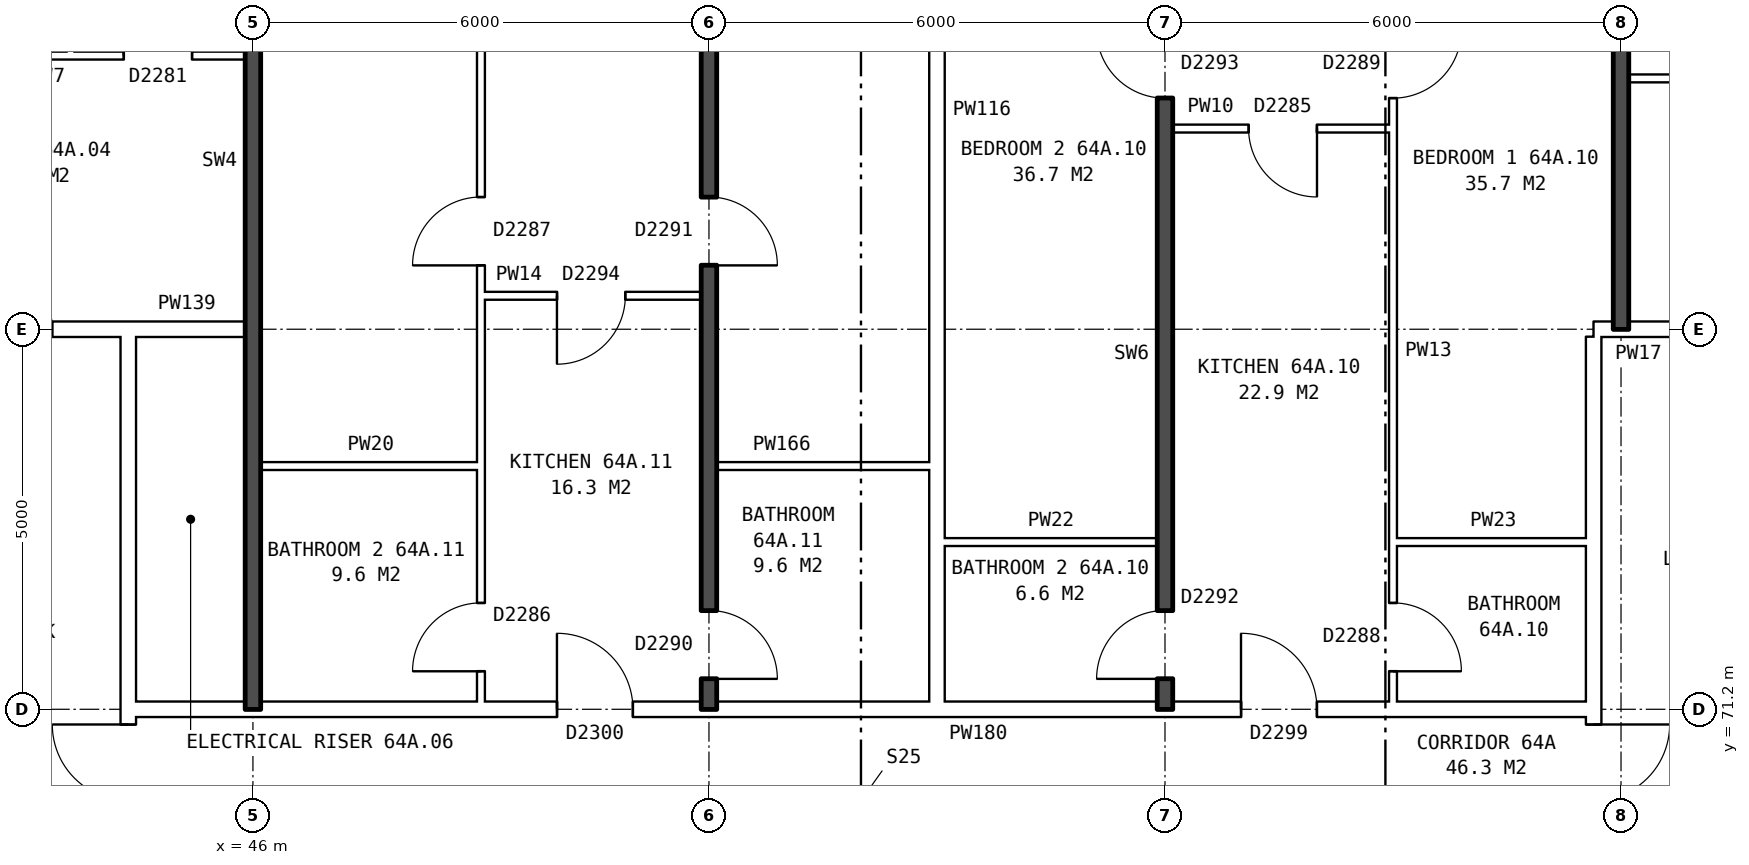
"""IFC4 building model, lengths in metres.
Left out: names, types, materials, properties, quantities, classifications, styles, units other than length and angle.
Written with IfcOpenShell. Run it as: python <this file> out.ifc"""

import sys

from ifc_helpers import new_model, si_unit, direction, frame, frame_2d, origin, place, context, subcontext, project, spatial, rectangle, extrude, element, fill, save


model = new_model("IFC4")
c1 = context("Model", 3, precision=1e-05, world=origin(), true_north=direction((0.0, 1.0)))
c2 = subcontext(c1, "Body", "Model", "MODEL_VIEW")
j1 = project(units=[si_unit("LENGTHUNIT", "METRE"), si_unit("PLANEANGLEUNIT", "RADIAN")], contexts=[c1])
p1 = place(None, origin())
s1 = spatial("IfcSite", under=j1, at=p1, CompositionType="ELEMENT")
p2 = place(p1, origin())
s2 = spatial("IfcBuilding", under=s1, at=p2, CompositionType="ELEMENT")
p3 = place(p2, frame((0.0, 0.0, 227.6)))
s3 = spatial("IfcBuildingStorey", under=s2, at=p3, CompositionType="ELEMENT", Elevation=227.6)
p4 = place(p3, frame((63.64, 63.9, 0.0), z_axis=(0.0, 0.0, 1.0), x_axis=(0.0, 1.0, 0.0)))
e1 = element("IfcWall", 1, at=p4, inside=s3, PredefinedType="PARTITIONING", context=c2, shape_type="SweptSolid", body=[
    extrude(rectangle(XDim=12.2, YDim=0.2, at=frame_2d((6.1, 0.0))), origin(), (0.0, 0.0, 1.0), 2.85),
])
p5 = place(p4, frame((5.1, 0.0, 0.0)))
e2 = element("IfcOpeningElement", 2, at=p5, cuts=e1, PredefinedType="OPENING", context=c2, shape_type="SweptSolid", body=[
    extrude(rectangle(XDim=2.0, YDim=2.1, at=frame_2d((1.0, 1.05))), frame((0.0, 0.11, 0.0), z_axis=(0.0, -1.0, 0.0), x_axis=(1.0, 0.0, 0.0)), (0.0, 0.0, 1.0), 0.22),
])
p6 = place(p3, frame((44.36, 63.9, 0.0), z_axis=(0.0, 0.0, 1.0), x_axis=(0.0, 1.0, 0.0)))
e3 = element("IfcWall", 3, at=p6, inside=s3, PredefinedType="PARTITIONING", context=c2, shape_type="SweptSolid", body=[
    extrude(rectangle(XDim=12.2, YDim=0.2, at=frame_2d((6.1, 0.0))), origin(), (0.0, 0.0, 1.0), 2.85),
])
p7 = place(p6, frame((5.1, 0.0, 0.0)))
e4 = element("IfcOpeningElement", 4, at=p7, cuts=e3, PredefinedType="OPENING", context=c2, shape_type="SweptSolid", body=[
    extrude(rectangle(XDim=2.0, YDim=2.1, at=frame_2d((1.0, 1.05))), frame((0.0, 0.11, 0.0), z_axis=(0.0, -1.0, 0.0), x_axis=(1.0, 0.0, 0.0)), (0.0, 0.0, 1.0), 0.22),
])
p8 = place(p3, frame((44.36, 71.2, 0.0), z_axis=(0.0, 0.0, 1.0), x_axis=(1.0, 0.0, 0.0)))
e5 = element("IfcWall", 5, at=p8, inside=s3, PredefinedType="PARTITIONING", context=c2, shape_type="SweptSolid", body=[
    extrude(rectangle(XDim=19.28, YDim=0.2, at=frame_2d((9.64, 0.0))), origin(), (0.0, 0.0, 1.0), 2.85),
])
p9 = place(p8, frame((14.64, 0.0, 0.0)))
e6 = element("IfcOpeningElement", 6, at=p9, cuts=e5, PredefinedType="OPENING", context=c2, shape_type="SweptSolid", body=[
    extrude(rectangle(XDim=1.0, YDim=2.1, at=frame_2d((0.5, 1.05))), frame((0.0, 0.11, 0.0), z_axis=(0.0, -1.0, 0.0), x_axis=(1.0, 0.0, 0.0)), (0.0, 0.0, 1.0), 0.22),
])
p10 = place(p8, frame((5.64, 0.0, 0.0)))
e7 = element("IfcOpeningElement", 7, at=p10, cuts=e5, PredefinedType="OPENING", context=c2, shape_type="SweptSolid", body=[
    extrude(rectangle(XDim=1.0, YDim=2.1, at=frame_2d((0.5, 1.05))), frame((0.0, 0.11, 0.0), z_axis=(0.0, -1.0, 0.0), x_axis=(1.0, 0.0, 0.0)), (0.0, 0.0, 1.0), 0.22),
])
p11 = place(p3, frame((55.1, 73.4, 0.0), z_axis=(0.0, 0.0, 1.0), x_axis=(1.0, 0.0, 0.0)))
e8 = element("IfcWall", 8, at=p11, inside=s3, PredefinedType="PARTITIONING", context=c2, shape_type="SweptSolid", body=[
    extrude(rectangle(XDim=2.8, YDim=0.1, at=frame_2d((1.4, 0.0))), origin(), (0.0, 0.0, 1.0), 2.85),
])
p12 = place(p3, frame((61.0, 73.4, 0.0), z_axis=(0.0, 0.0, 1.0), x_axis=(1.0, 0.0, 0.0)))
e9 = element("IfcWall", 9, at=p12, inside=s3, PredefinedType="PARTITIONING", context=c2, shape_type="SweptSolid", body=[
    extrude(rectangle(XDim=2.64, YDim=0.1, at=frame_2d((1.32, 0.0))), origin(), (0.0, 0.0, 1.0), 2.85),
])
p13 = place(p3, frame((46.1, 74.4, 0.0), z_axis=(0.0, 0.0, 1.0), x_axis=(1.0, 0.0, 0.0)))
e10 = element("IfcWall", 10, at=p13, inside=s3, PredefinedType="PARTITIONING", context=c2, shape_type="SweptSolid", body=[
    extrude(rectangle(XDim=2.9, YDim=0.1, at=frame_2d((1.45, 0.0))), origin(), (0.0, 0.0, 1.0), 2.85),
])
p14 = place(p3, frame((52.1, 74.4, 0.0), z_axis=(0.0, 0.0, 1.0), x_axis=(1.0, 0.0, 0.0)))
e11 = element("IfcWall", 11, at=p14, inside=s3, PredefinedType="PARTITIONING", context=c2, shape_type="SweptSolid", body=[
    extrude(rectangle(XDim=2.8, YDim=0.1, at=frame_2d((1.4, 0.0))), origin(), (0.0, 0.0, 1.0), 2.85),
])
p15 = place(p3, frame((41.36, 76.2, 0.0), z_axis=(0.0, 0.0, 1.0), x_axis=(1.0, 0.0, 0.0)))
e12 = element("IfcWall", 12, at=p15, inside=s3, PredefinedType="PARTITIONING", context=c2, shape_type="SweptSolid", body=[
    extrude(rectangle(XDim=3.0, YDim=0.2, at=frame_2d((1.5, 0.0))), origin(), (0.0, 0.0, 1.0), 2.85),
])
p16 = place(p15, frame((1.0, 0.0, 0.0)))
e13 = element("IfcOpeningElement", 13, at=p16, cuts=e12, PredefinedType="OPENING", context=c2, shape_type="SweptSolid", body=[
    extrude(rectangle(XDim=1.0, YDim=2.1, at=frame_2d((0.5, 1.05))), frame((0.0, 0.11, 0.0), z_axis=(0.0, -1.0, 0.0), x_axis=(1.0, 0.0, 0.0)), (0.0, 0.0, 1.0), 0.22),
])
p17 = place(p3, frame((44.36, 76.2, 0.0), z_axis=(0.0, 0.0, 1.0), x_axis=(1.0, 0.0, 0.0)))
e14 = element("IfcWall", 14, at=p17, inside=s3, PredefinedType="PARTITIONING", context=c2, shape_type="SweptSolid", body=[
    extrude(rectangle(XDim=1.54, YDim=0.2, at=frame_2d((0.77, 0.0))), origin(), (0.0, 0.0, 1.0), 2.85),
])
p18 = place(p3, frame((63.64, 76.2, 0.0), z_axis=(0.0, 0.0, 1.0), x_axis=(1.0, 0.0, 0.0)))
e15 = element("IfcWall", 15, at=p18, inside=s3, PredefinedType="PARTITIONING", context=c2, shape_type="SweptSolid", body=[
    extrude(rectangle(XDim=3.0, YDim=0.2, at=frame_2d((1.5, 0.0))), origin(), (0.0, 0.0, 1.0), 2.85),
])
p19 = place(p18, frame((1.18, 0.0, 0.0)))
e16 = element("IfcOpeningElement", 16, at=p19, cuts=e15, PredefinedType="OPENING", context=c2, shape_type="SweptSolid", body=[
    extrude(rectangle(XDim=1.0, YDim=2.1, at=frame_2d((0.5, 1.05))), frame((0.0, 0.11, 0.0), z_axis=(0.0, -1.0, 0.0), x_axis=(1.0, 0.0, 0.0)), (0.0, 0.0, 1.0), 0.22),
])
p20 = place(p3, frame((49.0, 76.64, 0.0), z_axis=(0.0, 0.0, 1.0), x_axis=(1.0, 0.0, 0.0)))
e17 = element("IfcWall", 17, at=p20, inside=s3, PredefinedType="PARTITIONING", context=c2, shape_type="SweptSolid", body=[
    extrude(rectangle(XDim=2.9, YDim=0.1, at=frame_2d((1.45, 0.0))), origin(), (0.0, 0.0, 1.0), 2.85),
])
p21 = place(p20, frame((1.0, 0.0, 0.0)))
e18 = element("IfcOpeningElement", 18, at=p21, cuts=e17, PredefinedType="OPENING", context=c2, shape_type="SweptSolid", body=[
    extrude(rectangle(XDim=0.9, YDim=2.1, at=frame_2d((0.45, 1.05))), frame((0.0, 0.06, 0.0), z_axis=(0.0, -1.0, 0.0), x_axis=(1.0, 0.0, 0.0)), (0.0, 0.0, 1.0), 0.12),
])
p22 = place(p3, frame((58.1, 78.84, 0.0), z_axis=(0.0, 0.0, 1.0), x_axis=(1.0, 0.0, 0.0)))
e19 = element("IfcWall", 19, at=p22, inside=s3, PredefinedType="PARTITIONING", context=c2, shape_type="SweptSolid", body=[
    extrude(rectangle(XDim=2.9, YDim=0.1, at=frame_2d((1.45, 0.0))), origin(), (0.0, 0.0, 1.0), 2.85),
])
p23 = place(p22, frame((1.0, 0.0, 0.0)))
e20 = element("IfcOpeningElement", 20, at=p23, cuts=e19, PredefinedType="OPENING", context=c2, shape_type="SweptSolid", body=[
    extrude(rectangle(XDim=0.9, YDim=2.1, at=frame_2d((0.45, 1.05))), frame((0.0, 0.06, 0.0), z_axis=(0.0, -1.0, 0.0), x_axis=(1.0, 0.0, 0.0)), (0.0, 0.0, 1.0), 0.12),
])
p24 = place(p3, frame((64.1, 79.5, 0.0), z_axis=(0.0, 0.0, 1.0), x_axis=(1.0, 0.0, 0.0)))
e21 = element("IfcWall", 21, at=p24, inside=s3, PredefinedType="PARTITIONING", context=c2, shape_type="SweptSolid", body=[
    extrude(rectangle(XDim=11.8, YDim=0.1, at=frame_2d((5.9, 0.0))), origin(), (0.0, 0.0, 1.0), 2.85),
])
p25 = place(p24, frame((3.65, 0.0, 0.0)))
e22 = element("IfcOpeningElement", 22, at=p25, cuts=e21, PredefinedType="OPENING", context=c2, shape_type="SweptSolid", body=[
    extrude(rectangle(XDim=0.9, YDim=2.1, at=frame_2d((0.45, 1.05))), frame((0.0, 0.06, 0.0), z_axis=(0.0, -1.0, 0.0), x_axis=(1.0, 0.0, 0.0)), (0.0, 0.0, 1.0), 0.12),
])
p26 = place(p24, frame((0.7, 0.0, 0.0)))
e23 = element("IfcOpeningElement", 23, at=p26, cuts=e21, PredefinedType="OPENING", context=c2, shape_type="SweptSolid", body=[
    extrude(rectangle(XDim=0.9, YDim=2.1, at=frame_2d((0.45, 1.05))), frame((0.0, 0.06, 0.0), z_axis=(0.0, -1.0, 0.0), x_axis=(1.0, 0.0, 0.0)), (0.0, 0.0, 1.0), 0.12),
])
p27 = place(p3, frame((40.1, 79.8, 0.0), z_axis=(0.0, 0.0, 1.0), x_axis=(1.0, 0.0, 0.0)))
e24 = element("IfcWall", 24, at=p27, inside=s3, PredefinedType="PARTITIONING", context=c2, shape_type="SweptSolid", body=[
    extrude(rectangle(XDim=5.8, YDim=0.1, at=frame_2d((2.9, 0.0))), origin(), (0.0, 0.0, 1.0), 2.85),
])
p28 = place(p27, frame((1.3, 0.0, 0.0)))
e25 = element("IfcOpeningElement", 25, at=p28, cuts=e24, PredefinedType="OPENING", context=c2, shape_type="SweptSolid", body=[
    extrude(rectangle(XDim=0.9, YDim=2.1, at=frame_2d((0.45, 1.05))), frame((0.0, 0.06, 0.0), z_axis=(0.0, -1.0, 0.0), x_axis=(1.0, 0.0, 0.0)), (0.0, 0.0, 1.0), 0.12),
])
p29 = place(p27, frame((4.2, 0.0, 0.0)))
e26 = element("IfcOpeningElement", 26, at=p29, cuts=e24, PredefinedType="OPENING", context=c2, shape_type="SweptSolid", body=[
    extrude(rectangle(XDim=0.9, YDim=2.1, at=frame_2d((0.45, 1.05))), frame((0.0, 0.06, 0.0), z_axis=(0.0, -1.0, 0.0), x_axis=(1.0, 0.0, 0.0)), (0.0, 0.0, 1.0), 0.12),
])
p30 = place(p3, frame((46.0, 71.2, 0.0), z_axis=(0.0, 0.0, 1.0), x_axis=(0.0, 1.0, 0.0)))
e27 = element("IfcWall", 27, at=p30, inside=s3, PredefinedType="SOLIDWALL", context=c2, shape_type="SweptSolid", body=[
    extrude(rectangle(XDim=14.44, YDim=0.2, at=frame_2d((7.22, 0.0))), origin(), (0.0, 0.0, 1.0), 2.85),
])
p31 = place(p3, frame((49.0, 71.3, 0.0), z_axis=(0.0, 0.0, 1.0), x_axis=(0.0, 1.0, 0.0)))
e28 = element("IfcWall", 28, at=p31, inside=s3, PredefinedType="PARTITIONING", context=c2, shape_type="SweptSolid", body=[
    extrude(rectangle(XDim=14.34, YDim=0.1, at=frame_2d((7.17, 0.0))), origin(), (0.0, 0.0, 1.0), 2.85),
])
p32 = place(p31, frame((5.74, 0.0, 0.0)))
e29 = element("IfcOpeningElement", 29, at=p32, cuts=e28, PredefinedType="OPENING", context=c2, shape_type="SweptSolid", body=[
    extrude(rectangle(XDim=0.9, YDim=2.1, at=frame_2d((0.45, 1.05))), frame((0.0, 0.06, 0.0), z_axis=(0.0, -1.0, 0.0), x_axis=(1.0, 0.0, 0.0)), (0.0, 0.0, 1.0), 0.12),
])
p33 = place(p31, frame((0.4, 0.0, 0.0)))
e30 = element("IfcOpeningElement", 30, at=p33, cuts=e28, PredefinedType="OPENING", context=c2, shape_type="SweptSolid", body=[
    extrude(rectangle(XDim=0.9, YDim=2.1, at=frame_2d((0.45, 1.05))), frame((0.0, 0.06, 0.0), z_axis=(0.0, -1.0, 0.0), x_axis=(1.0, 0.0, 0.0)), (0.0, 0.0, 1.0), 0.12),
])
p34 = place(p3, frame((52.0, 71.2, 0.0), z_axis=(0.0, 0.0, 1.0), x_axis=(0.0, 1.0, 0.0)))
e31 = element("IfcWall", 31, at=p34, inside=s3, PredefinedType="SOLIDWALL", context=c2, shape_type="SweptSolid", body=[
    extrude(rectangle(XDim=14.44, YDim=0.2, at=frame_2d((7.22, 0.0))), origin(), (0.0, 0.0, 1.0), 2.85),
])
p35 = place(p34, frame((5.84, 0.0, 0.0)))
e32 = element("IfcOpeningElement", 32, at=p35, cuts=e31, PredefinedType="OPENING", context=c2, shape_type="SweptSolid", body=[
    extrude(rectangle(XDim=0.9, YDim=2.1, at=frame_2d((0.45, 1.05))), frame((0.0, 0.11, 0.0), z_axis=(0.0, -1.0, 0.0), x_axis=(1.0, 0.0, 0.0)), (0.0, 0.0, 1.0), 0.22),
])
p36 = place(p34, frame((0.4, 0.0, 0.0)))
e33 = element("IfcOpeningElement", 33, at=p36, cuts=e31, PredefinedType="OPENING", context=c2, shape_type="SweptSolid", body=[
    extrude(rectangle(XDim=0.9, YDim=2.1, at=frame_2d((0.45, 1.05))), frame((0.0, 0.11, 0.0), z_axis=(0.0, -1.0, 0.0), x_axis=(1.0, 0.0, 0.0)), (0.0, 0.0, 1.0), 0.22),
])
p37 = place(p3, frame((55.0, 71.3, 0.0), z_axis=(0.0, 0.0, 1.0), x_axis=(0.0, 1.0, 0.0)))
e34 = element("IfcWall", 34, at=p37, inside=s3, PredefinedType="PARTITIONING", context=c2, shape_type="SweptSolid", body=[
    extrude(rectangle(XDim=14.34, YDim=0.2, at=frame_2d((7.17, 0.0))), origin(), (0.0, 0.0, 1.0), 2.85),
])
p38 = place(p3, frame((58.0, 71.2, 0.0), z_axis=(0.0, 0.0, 1.0), x_axis=(0.0, 1.0, 0.0)))
e35 = element("IfcWall", 35, at=p38, inside=s3, PredefinedType="SOLIDWALL", context=c2, shape_type="SweptSolid", body=[
    extrude(rectangle(XDim=14.44, YDim=0.2, at=frame_2d((7.22, 0.0))), origin(), (0.0, 0.0, 1.0), 2.85),
])
p39 = place(p38, frame((8.04, 0.0, 0.0)))
e36 = element("IfcOpeningElement", 36, at=p39, cuts=e35, PredefinedType="OPENING", context=c2, shape_type="SweptSolid", body=[
    extrude(rectangle(XDim=0.9, YDim=2.1, at=frame_2d((0.45, 1.05))), frame((0.0, 0.11, 0.0), z_axis=(0.0, -1.0, 0.0), x_axis=(1.0, 0.0, 0.0)), (0.0, 0.0, 1.0), 0.22),
])
p40 = place(p38, frame((0.4, 0.0, 0.0)))
e37 = element("IfcOpeningElement", 37, at=p40, cuts=e35, PredefinedType="OPENING", context=c2, shape_type="SweptSolid", body=[
    extrude(rectangle(XDim=0.9, YDim=2.1, at=frame_2d((0.45, 1.05))), frame((0.0, 0.11, 0.0), z_axis=(0.0, -1.0, 0.0), x_axis=(1.0, 0.0, 0.0)), (0.0, 0.0, 1.0), 0.22),
])
p41 = place(p3, frame((61.0, 71.3, 0.0), z_axis=(0.0, 0.0, 1.0), x_axis=(0.0, 1.0, 0.0)))
e38 = element("IfcWall", 38, at=p41, inside=s3, PredefinedType="PARTITIONING", context=c2, shape_type="SweptSolid", body=[
    extrude(rectangle(XDim=14.34, YDim=0.1, at=frame_2d((7.17, 0.0))), origin(), (0.0, 0.0, 1.0), 2.85),
])
p42 = place(p41, frame((7.94, 0.0, 0.0)))
e39 = element("IfcOpeningElement", 39, at=p42, cuts=e38, PredefinedType="OPENING", context=c2, shape_type="SweptSolid", body=[
    extrude(rectangle(XDim=0.9, YDim=2.1, at=frame_2d((0.45, 1.05))), frame((0.0, 0.06, 0.0), z_axis=(0.0, -1.0, 0.0), x_axis=(1.0, 0.0, 0.0)), (0.0, 0.0, 1.0), 0.12),
])
p43 = place(p41, frame((0.4, 0.0, 0.0)))
e40 = element("IfcOpeningElement", 40, at=p43, cuts=e38, PredefinedType="OPENING", context=c2, shape_type="SweptSolid", body=[
    extrude(rectangle(XDim=0.9, YDim=2.1, at=frame_2d((0.45, 1.05))), frame((0.0, 0.06, 0.0), z_axis=(0.0, -1.0, 0.0), x_axis=(1.0, 0.0, 0.0)), (0.0, 0.0, 1.0), 0.12),
])
p44 = place(p3, frame((64.0, 76.2, 0.0), z_axis=(0.0, 0.0, 1.0), x_axis=(0.0, 1.0, 0.0)))
e41 = element("IfcWall", 41, at=p44, inside=s3, PredefinedType="SOLIDWALL", context=c2, shape_type="SweptSolid", body=[
    extrude(rectangle(XDim=9.44, YDim=0.2, at=frame_2d((4.72, 0.0))), origin(), (0.0, 0.0, 1.0), 2.85),
])
p45 = place(p5, frame((2.0, 0.0, 0.0), z_axis=(0.0, 0.0, 1.0), x_axis=(-1.0, 0.0, 0.0)))
e42 = element("IfcDoor", 42, at=p45, inside=s3, OperationType="DOUBLE_DOOR_SINGLE_SWING", PredefinedType="DOOR", context=c2, shape_type="SweptSolid", body=[
    extrude(rectangle(XDim=2.0, YDim=2.1, at=frame_2d((1.0, 1.05))), frame((0.0, 0.025, 0.0), z_axis=(0.0, -1.0, 0.0), x_axis=(1.0, 0.0, 0.0)), (0.0, 0.0, 1.0), 0.05),
])
fill(e2, e42)
p46 = place(p7, origin())
e43 = element("IfcDoor", 43, at=p46, inside=s3, OperationType="DOUBLE_DOOR_SINGLE_SWING", PredefinedType="DOOR", context=c2, shape_type="SweptSolid", body=[
    extrude(rectangle(XDim=2.0, YDim=2.1, at=frame_2d((1.0, 1.05))), frame((0.0, 0.025, 0.0), z_axis=(0.0, -1.0, 0.0), x_axis=(1.0, 0.0, 0.0)), (0.0, 0.0, 1.0), 0.05),
])
fill(e4, e43)
p47 = place(p29, origin())
e44 = element("IfcDoor", 44, at=p47, inside=s3, OperationType="SINGLE_SWING_LEFT", PredefinedType="DOOR", context=c2, shape_type="SweptSolid", body=[
    extrude(rectangle(XDim=0.9, YDim=2.1, at=frame_2d((0.45, 1.05))), frame((0.0, 0.025, 0.0), z_axis=(0.0, -1.0, 0.0), x_axis=(1.0, 0.0, 0.0)), (0.0, 0.0, 1.0), 0.05),
])
fill(e26, e44)
p48 = place(p42, frame((0.9, 0.0, 0.0), z_axis=(0.0, 0.0, 1.0), x_axis=(-1.0, 0.0, 0.0)))
e45 = element("IfcDoor", 45, at=p48, inside=s3, OperationType="SINGLE_SWING_LEFT", PredefinedType="DOOR", context=c2, shape_type="SweptSolid", body=[
    extrude(rectangle(XDim=0.9, YDim=2.1, at=frame_2d((0.45, 1.05))), frame((0.0, 0.025, 0.0), z_axis=(0.0, -1.0, 0.0), x_axis=(1.0, 0.0, 0.0)), (0.0, 0.0, 1.0), 0.05),
])
fill(e39, e45)
p49 = place(p39, origin())
e46 = element("IfcDoor", 46, at=p49, inside=s3, OperationType="SINGLE_SWING_RIGHT", PredefinedType="DOOR", context=c2, shape_type="SweptSolid", body=[
    extrude(rectangle(XDim=0.9, YDim=2.1, at=frame_2d((0.45, 1.05))), frame((0.0, 0.025, 0.0), z_axis=(0.0, -1.0, 0.0), x_axis=(1.0, 0.0, 0.0)), (0.0, 0.0, 1.0), 0.05),
])
fill(e36, e46)
p50 = place(p9, origin())
e47 = element("IfcDoor", 47, at=p50, inside=s3, OperationType="SINGLE_SWING_LEFT", PredefinedType="DOOR", context=c2, shape_type="SweptSolid", body=[
    extrude(rectangle(XDim=1.0, YDim=2.1, at=frame_2d((0.5, 1.05))), frame((0.0, 0.025, 0.0), z_axis=(0.0, -1.0, 0.0), x_axis=(1.0, 0.0, 0.0)), (0.0, 0.0, 1.0), 0.05),
])
fill(e6, e47)
p51 = place(p23, frame((0.9, 0.0, 0.0), z_axis=(0.0, 0.0, 1.0), x_axis=(-1.0, 0.0, 0.0)))
e48 = element("IfcDoor", 48, at=p51, inside=s3, OperationType="SINGLE_SWING_LEFT", PredefinedType="DOOR", context=c2, shape_type="SweptSolid", body=[
    extrude(rectangle(XDim=0.9, YDim=2.1, at=frame_2d((0.45, 1.05))), frame((0.0, 0.025, 0.0), z_axis=(0.0, -1.0, 0.0), x_axis=(1.0, 0.0, 0.0)), (0.0, 0.0, 1.0), 0.05),
])
fill(e20, e48)
p52 = place(p43, frame((0.9, 0.0, 0.0), z_axis=(0.0, 0.0, 1.0), x_axis=(-1.0, 0.0, 0.0)))
e49 = element("IfcDoor", 49, at=p52, inside=s3, OperationType="SINGLE_SWING_RIGHT", PredefinedType="DOOR", context=c2, shape_type="SweptSolid", body=[
    extrude(rectangle(XDim=0.9, YDim=2.1, at=frame_2d((0.45, 1.05))), frame((0.0, 0.025, 0.0), z_axis=(0.0, -1.0, 0.0), x_axis=(1.0, 0.0, 0.0)), (0.0, 0.0, 1.0), 0.05),
])
fill(e40, e49)
p53 = place(p40, origin())
e50 = element("IfcDoor", 50, at=p53, inside=s3, OperationType="SINGLE_SWING_LEFT", PredefinedType="DOOR", context=c2, shape_type="SweptSolid", body=[
    extrude(rectangle(XDim=0.9, YDim=2.1, at=frame_2d((0.45, 1.05))), frame((0.0, 0.025, 0.0), z_axis=(0.0, -1.0, 0.0), x_axis=(1.0, 0.0, 0.0)), (0.0, 0.0, 1.0), 0.05),
])
fill(e37, e50)
p54 = place(p35, frame((0.9, 0.0, 0.0), z_axis=(0.0, 0.0, 1.0), x_axis=(-1.0, 0.0, 0.0)))
e51 = element("IfcDoor", 51, at=p54, inside=s3, OperationType="SINGLE_SWING_RIGHT", PredefinedType="DOOR", context=c2, shape_type="SweptSolid", body=[
    extrude(rectangle(XDim=0.9, YDim=2.1, at=frame_2d((0.45, 1.05))), frame((0.0, 0.025, 0.0), z_axis=(0.0, -1.0, 0.0), x_axis=(1.0, 0.0, 0.0)), (0.0, 0.0, 1.0), 0.05),
])
fill(e32, e51)
p55 = place(p32, origin())
e52 = element("IfcDoor", 52, at=p55, inside=s3, OperationType="SINGLE_SWING_LEFT", PredefinedType="DOOR", context=c2, shape_type="SweptSolid", body=[
    extrude(rectangle(XDim=0.9, YDim=2.1, at=frame_2d((0.45, 1.05))), frame((0.0, 0.025, 0.0), z_axis=(0.0, -1.0, 0.0), x_axis=(1.0, 0.0, 0.0)), (0.0, 0.0, 1.0), 0.05),
])
fill(e29, e52)
p56 = place(p10, origin())
e53 = element("IfcDoor", 53, at=p56, inside=s3, OperationType="SINGLE_SWING_LEFT", PredefinedType="DOOR", context=c2, shape_type="SweptSolid", body=[
    extrude(rectangle(XDim=1.0, YDim=2.1, at=frame_2d((0.5, 1.05))), frame((0.0, 0.025, 0.0), z_axis=(0.0, -1.0, 0.0), x_axis=(1.0, 0.0, 0.0)), (0.0, 0.0, 1.0), 0.05),
])
fill(e7, e53)
p57 = place(p21, frame((0.9, 0.0, 0.0), z_axis=(0.0, 0.0, 1.0), x_axis=(-1.0, 0.0, 0.0)))
e54 = element("IfcDoor", 54, at=p57, inside=s3, OperationType="SINGLE_SWING_RIGHT", PredefinedType="DOOR", context=c2, shape_type="SweptSolid", body=[
    extrude(rectangle(XDim=0.9, YDim=2.1, at=frame_2d((0.45, 1.05))), frame((0.0, 0.025, 0.0), z_axis=(0.0, -1.0, 0.0), x_axis=(1.0, 0.0, 0.0)), (0.0, 0.0, 1.0), 0.05),
])
fill(e18, e54)
p58 = place(p36, frame((0.9, 0.0, 0.0), z_axis=(0.0, 0.0, 1.0), x_axis=(-1.0, 0.0, 0.0)))
e55 = element("IfcDoor", 55, at=p58, inside=s3, OperationType="SINGLE_SWING_RIGHT", PredefinedType="DOOR", context=c2, shape_type="SweptSolid", body=[
    extrude(rectangle(XDim=0.9, YDim=2.1, at=frame_2d((0.45, 1.05))), frame((0.0, 0.025, 0.0), z_axis=(0.0, -1.0, 0.0), x_axis=(1.0, 0.0, 0.0)), (0.0, 0.0, 1.0), 0.05),
])
fill(e33, e55)
p59 = place(p33, origin())
e56 = element("IfcDoor", 56, at=p59, inside=s3, OperationType="SINGLE_SWING_LEFT", PredefinedType="DOOR", context=c2, shape_type="SweptSolid", body=[
    extrude(rectangle(XDim=0.9, YDim=2.1, at=frame_2d((0.45, 1.05))), frame((0.0, 0.025, 0.0), z_axis=(0.0, -1.0, 0.0), x_axis=(1.0, 0.0, 0.0)), (0.0, 0.0, 1.0), 0.05),
])
fill(e30, e56)
save(model, sys.argv[1])
